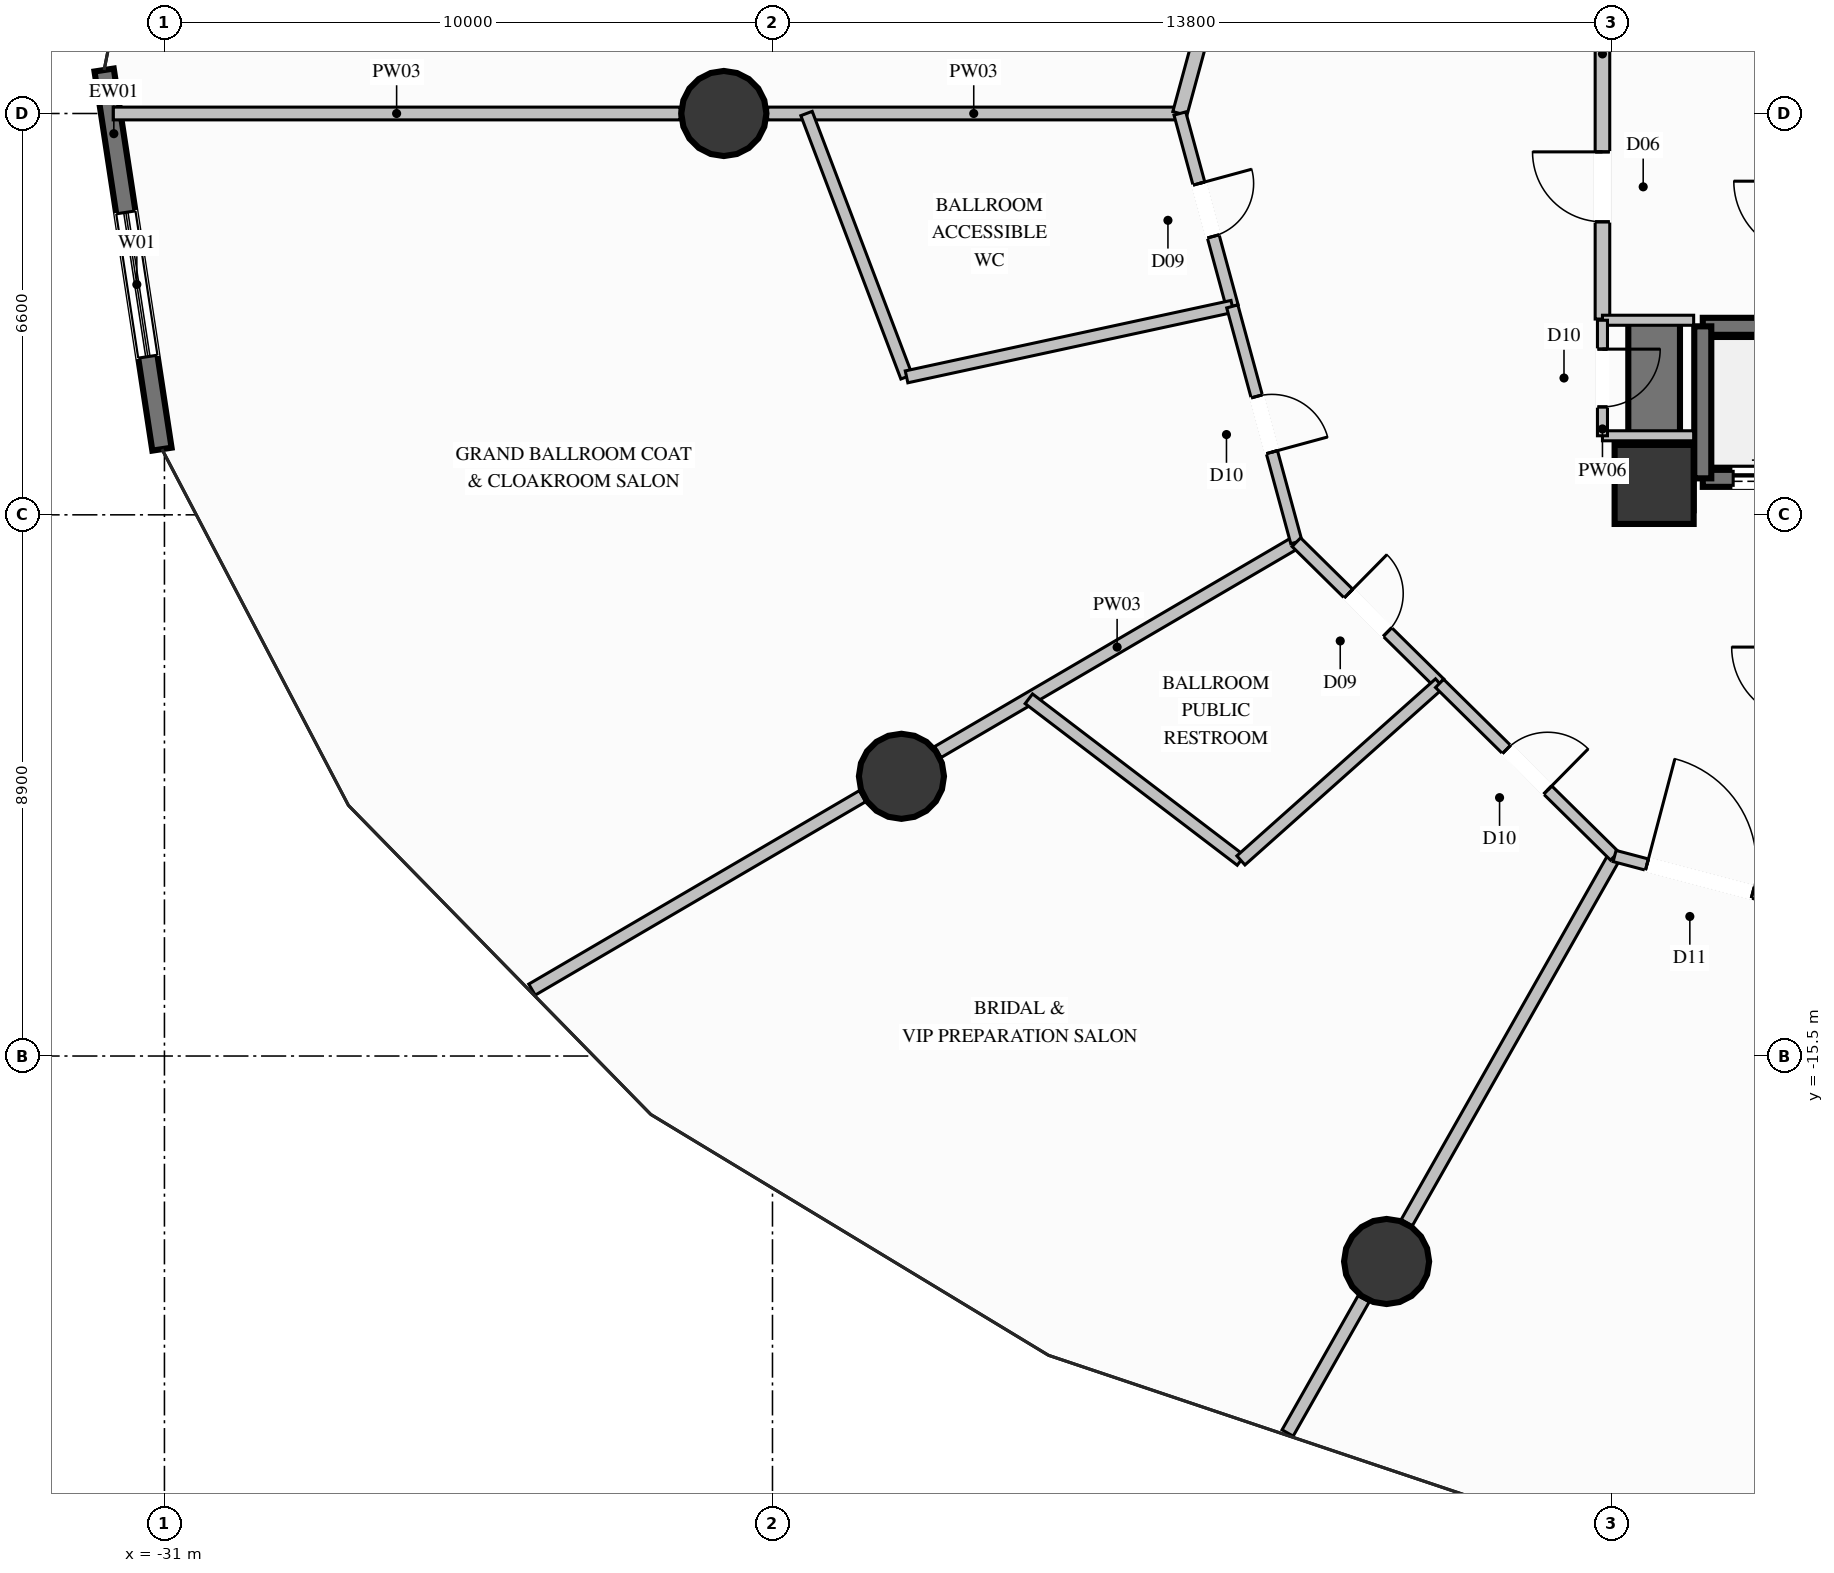
"""IFC4 building model, lengths in metres.
Left out: names, types, materials, properties, quantities, classifications, styles, units other than length and angle.
Written with IfcOpenShell. Run it as: python <this file> out.ifc"""

import sys

from ifc_helpers import new_model, si_unit, direction, frame, frame_2d, origin, origin_2d, place, context, subcontext, project, spatial, rectangle, circle, extrude, element, fill, save


model = new_model("IFC4")
c1 = context("Model", 3, precision=1e-05, world=origin(), true_north=direction((0.0, 1.0)))
c2 = subcontext(c1, "Body", "Model", "MODEL_VIEW")
j1 = project(units=[si_unit("LENGTHUNIT", "METRE"), si_unit("PLANEANGLEUNIT", "RADIAN")], contexts=[c1])
p1 = place(None, origin())
s1 = spatial("IfcSite", under=j1, at=p1, CompositionType="ELEMENT")
p2 = place(p1, origin())
s2 = spatial("IfcBuilding", under=s1, at=p2, CompositionType="ELEMENT")
p3 = place(p2, frame((0.0, 0.0, 12.6)))
s3 = spatial("IfcBuildingStorey", under=s2, at=p3, CompositionType="ELEMENT", Elevation=12.6)
p4 = place(p3, frame((-6.5, -6.1, 0.0), z_axis=(0.0, 0.0, 1.0), x_axis=(1.0, 0.0, 0.0)))
e1 = element("IfcColumn", 1, at=p4, inside=s3, PredefinedType="COLUMN", context=c2, shape_type="SweptSolid", body=[
    extrude(rectangle(XDim=1.3, YDim=1.3, at=origin_2d()), origin(), (0.0, 0.0, 1.0), 6.0),
])
p5 = place(p3, frame((-6.075, -6.1, 0.0), z_axis=(0.0, 0.0, 1.0), x_axis=(1.0, 0.0, 0.0)))
e2 = element("IfcWall", 2, at=p5, inside=s3, PredefinedType="SHEAR", context=c2, shape_type="SweptSolid", body=[
    extrude(rectangle(XDim=0.225, YDim=0.85, at=frame_2d((0.112, 0.0))), origin(), (0.0, 0.0, 1.0), 6.0),
])
p6 = place(p3, frame((-6.5, -6.525, 0.0), z_axis=(0.0, 0.0, 1.0), x_axis=(0.0, 1.0, 0.0)))
e3 = element("IfcWall", 3, at=p6, inside=s3, PredefinedType="SHEAR", context=c2, shape_type="SweptSolid", body=[
    extrude(rectangle(XDim=3.175, YDim=0.85, at=frame_2d((1.587, 0.0))), origin(), (0.0, 0.0, 1.0), 6.0),
])
for number, where, z_axis, x_axis in (
    (4, (-21.8, 0.0, 0.0), (0.0, 0.0, 1.0), (1.0, 0.0, 0.0)),
    (5, (-18.879, -10.9, 0.0), (0.0, 0.0, 1.0), (1.0, 0.0, 0.0)),
    (6, (-10.9, -18.879, 0.0), (0.0, 0.0, 1.0), (1.0, 0.0, 0.0)),
):
    element("IfcColumn", number, at=place(p3, frame(where, z_axis=z_axis, x_axis=x_axis)), inside=s3, PredefinedType="COLUMN", context=c2, shape_type="SweptSolid", body=[
        extrude(circle(Radius=0.7, at=origin_2d()), origin(), (0.0, 0.0, 1.0), 6.0),
    ])
p7 = place(p3, frame((-31.041, -5.52, 0.0), z_axis=(0.0, 0.0, 1.0), x_axis=(-0.150768496596, 0.988569097451, 0.0)))
e7 = element("IfcWall", 7, at=p7, inside=s3, PredefinedType="SOLIDWALL", context=c2, shape_type="SweptSolid", body=[
    extrude(rectangle(XDim=6.307, YDim=0.32, at=frame_2d((3.154, 0.0))), origin(), (0.0, 0.0, 1.0), 5.64),
])
p8 = place(p7, frame((1.539, 0.0, 0.65)))
e8 = element("IfcOpeningElement", 8, at=p8, cuts=e7, PredefinedType="OPENING", context=c2, shape_type="SweptSolid", body=[
    extrude(rectangle(XDim=2.4, YDim=3.2, at=frame_2d((1.2, 1.6))), frame((0.0, 0.17, 0.0), z_axis=(0.0, -1.0, 0.0), x_axis=(1.0, 0.0, 0.0)), (0.0, 0.0, 1.0), 0.34),
])
p9 = place(p3, frame((-5.7, -6.0, 0.0), z_axis=(0.0, 0.0, 1.0), x_axis=(1.0, 0.0, 0.0)))
e9 = element("IfcWall", 9, at=p9, inside=s3, PredefinedType="SOLIDWALL", context=c2, shape_type="SweptSolid", body=[
    extrude(rectangle(XDim=2.1, YDim=0.28, at=frame_2d((1.05, 0.0))), origin(), (0.0, 0.0, 1.0), 5.64),
])
p10 = place(p9, frame((0.5, 0.0, 0.0)))
e10 = element("IfcOpeningElement", 10, at=p10, cuts=e9, PredefinedType="OPENING", context=c2, shape_type="SweptSolid", body=[
    extrude(rectangle(XDim=1.1, YDim=2.2, at=frame_2d((0.55, 1.1))), frame((0.0, 0.15, 0.0), z_axis=(0.0, -1.0, 0.0), x_axis=(1.0, 0.0, 0.0)), (0.0, 0.0, 1.0), 0.3),
])
p11 = place(p3, frame((-3.6, -3.5, 0.0), z_axis=(0.0, 0.0, 1.0), x_axis=(-1.0, 0.0, 0.0)))
e11 = element("IfcWall", 11, at=p11, inside=s3, PredefinedType="SOLIDWALL", context=c2, shape_type="SweptSolid", body=[
    extrude(rectangle(XDim=2.1, YDim=0.28, at=frame_2d((1.05, 0.0))), origin(), (0.0, 0.0, 1.0), 5.64),
])
p12 = place(p3, frame((-5.7, -3.5, 0.0), z_axis=(0.0, 0.0, 1.0), x_axis=(0.0, -1.0, 0.0)))
e12 = element("IfcWall", 12, at=p12, inside=s3, PredefinedType="SOLIDWALL", context=c2, shape_type="SweptSolid", body=[
    extrude(rectangle(XDim=2.5, YDim=0.28, at=frame_2d((1.25, 0.0))), origin(), (0.0, 0.0, 1.0), 5.64),
])
p13 = place(p3, frame((-7.35, -3.38, 0.0), z_axis=(0.0, 0.0, 1.0), x_axis=(0.0, 1.0, 0.0)))
e13 = element("IfcWall", 13, at=p13, inside=s3, PredefinedType="PARTITIONING", context=c2, shape_type="SweptSolid", body=[
    extrude(rectangle(XDim=5.72, YDim=0.24, at=frame_2d((2.86, 0.0))), origin(), (0.0, 0.0, 1.0), 4.525),
])
p14 = place(p13, frame((1.599, 0.0, 0.0)))
e14 = element("IfcOpeningElement", 14, at=p14, cuts=e13, PredefinedType="OPENING", context=c2, shape_type="SweptSolid", body=[
    extrude(rectangle(XDim=1.15, YDim=2.2, at=frame_2d((0.575, 1.1))), frame((0.0, 0.13, 0.0), z_axis=(0.0, -1.0, 0.0), x_axis=(1.0, 0.0, 0.0)), (0.0, 0.0, 1.0), 0.26),
])
p15 = place(p3, frame((-7.35, -5.3, 0.0), z_axis=(0.0, 0.0, 1.0), x_axis=(1.0, 0.0, 0.0)))
e15 = element("IfcWall", 15, at=p15, inside=s3, PredefinedType="PARTITIONING", context=c2, shape_type="SweptSolid", body=[
    extrude(rectangle(XDim=1.5, YDim=0.165, at=frame_2d((0.75, 0.0))), origin(), (0.0, 0.0, 1.0), 3.825),
])
p16 = place(p3, frame((-5.85, -3.4, 0.0), z_axis=(0.0, 0.0, 1.0), x_axis=(-1.0, 0.0, 0.0)))
e16 = element("IfcWall", 16, at=p16, inside=s3, PredefinedType="PARTITIONING", context=c2, shape_type="SweptSolid", body=[
    extrude(rectangle(XDim=1.5, YDim=0.165, at=frame_2d((0.75, 0.0))), origin(), (0.0, 0.0, 1.0), 5.64),
])
p17 = place(p3, frame((-7.35, -3.4, 0.0), z_axis=(0.0, 0.0, 1.0), x_axis=(0.0, -1.0, 0.0)))
e17 = element("IfcWall", 17, at=p17, inside=s3, PredefinedType="PARTITIONING", context=c2, shape_type="SweptSolid", body=[
    extrude(rectangle(XDim=1.9, YDim=0.165, at=frame_2d((0.95, 0.0))), origin(), (0.0, 0.0, 1.0), 4.525),
])
p18 = place(p17, frame((0.475, 0.0, 0.0)))
e18 = element("IfcOpeningElement", 18, at=p18, cuts=e17, PredefinedType="OPENING", context=c2, shape_type="SweptSolid", body=[
    extrude(rectangle(XDim=0.95, YDim=2.1, at=frame_2d((0.475, 1.05))), frame((0.0, 0.093, 0.0), z_axis=(0.0, -1.0, 0.0), x_axis=(1.0, 0.0, 0.0)), (0.0, 0.0, 1.0), 0.185),
])
p19 = place(p3, frame((-14.3, 0.0, 0.0), z_axis=(0.0, 0.0, 1.0), x_axis=(-1.0, 0.0, 0.0)))
e19 = element("IfcWall", 19, at=p19, inside=s3, PredefinedType="PARTITIONING", context=c2, shape_type="SweptSolid", body=[
    extrude(rectangle(XDim=6.78, YDim=0.21, at=frame_2d((3.39, 0.0))), origin(), (0.0, 0.0, 1.0), 3.825),
])
p20 = place(p3, frame((-22.52, 0.0, 0.0), z_axis=(0.0, 0.0, 1.0), x_axis=(-1.0, 0.0, 0.0)))
e20 = element("IfcWall", 20, at=p20, inside=s3, PredefinedType="PARTITIONING", context=c2, shape_type="SweptSolid", body=[
    extrude(rectangle(XDim=9.323, YDim=0.21, at=frame_2d((4.662, 0.0))), origin(), (0.0, 0.0, 1.0), 5.64),
])
p21 = place(p3, frame((-12.384, -7.05, 0.0), z_axis=(0.0, 0.0, 1.0), x_axis=(-0.863039168853, -0.505137004213, 0.0)))
e21 = element("IfcWall", 21, at=p21, inside=s3, PredefinedType="PARTITIONING", context=c2, shape_type="SweptSolid", body=[
    extrude(rectangle(XDim=6.832, YDim=0.21, at=frame_2d((3.416, 0.0))), origin(), (0.0, 0.0, 1.0), 3.825),
])
p22 = place(p3, frame((-19.52, -11.227, 0.0), z_axis=(0.0, 0.0, 1.0), x_axis=(-0.863055278665, -0.50510947919, 0.0)))
e22 = element("IfcWall", 22, at=p22, inside=s3, PredefinedType="PARTITIONING", context=c2, shape_type="SweptSolid", body=[
    extrude(rectangle(XDim=6.297, YDim=0.21, at=frame_2d((3.149, 0.0))), origin(), (0.0, 0.0, 1.0), 5.64),
])
p23 = place(p3, frame((-7.15, -12.211, 0.0), z_axis=(0.0, 0.0, 1.0), x_axis=(-0.493203653226, -0.869913878752, 0.0)))
e23 = element("IfcWall", 23, at=p23, inside=s3, PredefinedType="PARTITIONING", context=c2, shape_type="SweptSolid", body=[
    extrude(rectangle(XDim=6.931, YDim=0.21, at=frame_2d((3.465, 0.0))), origin(), (0.0, 0.0, 1.0), 3.825),
])
p24 = place(p3, frame((-11.277, -19.492, 0.0), z_axis=(0.0, 0.0, 1.0), x_axis=(-0.49310969453, -0.869967142575, 0.0)))
e24 = element("IfcWall", 24, at=p24, inside=s3, PredefinedType="PARTITIONING", context=c2, shape_type="SweptSolid", body=[
    extrude(rectangle(XDim=2.537, YDim=0.21, at=frame_2d((1.269, 0.0))), origin(), (0.0, 0.0, 1.0), 5.64),
])
p25 = place(p3, frame((-12.384, 7.05, 0.0), z_axis=(0.0, 0.0, 1.0), x_axis=(-0.262260528785, -0.964997106235, 0.0)))
e25 = element("IfcWall", 25, at=p25, inside=s3, PredefinedType="PARTITIONING", context=c2, shape_type="SweptSolid", body=[
    extrude(rectangle(XDim=7.306, YDim=0.24, at=frame_2d((3.653, 0.0))), origin(), (0.0, 0.0, 1.0), 5.64),
])
p26 = place(p3, frame((-14.3, 0.0, 0.0), z_axis=(0.0, 0.0, 1.0), x_axis=(0.262250045558, -0.964999955236, 0.0)))
e26 = element("IfcWall", 26, at=p26, inside=s3, PredefinedType="PLUMBINGWALL", context=c2, shape_type="SweptSolid", body=[
    extrude(rectangle(XDim=3.287, YDim=0.2, at=frame_2d((1.644, 0.0))), origin(), (0.0, 0.0, 1.0), 5.64),
])
p27 = place(p26, frame((1.194, 0.0, 0.0)))
e27 = element("IfcOpeningElement", 27, at=p27, cuts=e26, PredefinedType="OPENING", context=c2, shape_type="SweptSolid", body=[
    extrude(rectangle(XDim=0.9, YDim=2.1, at=frame_2d((0.45, 1.05))), frame((0.0, 0.11, 0.0), z_axis=(0.0, -1.0, 0.0), x_axis=(1.0, 0.0, 0.0)), (0.0, 0.0, 1.0), 0.22),
])
p28 = place(p3, frame((-20.44, 0.0, 0.0), z_axis=(0.0, 0.0, 1.0), x_axis=(0.355070404359, -0.934839562678, 0.0)))
e28 = element("IfcWall", 28, at=p28, inside=s3, PredefinedType="PLUMBINGWALL", context=c2, shape_type="SweptSolid", body=[
    extrude(rectangle(XDim=4.633, YDim=0.2, at=frame_2d((2.316, 0.0))), origin(), (0.0, 0.0, 1.0), 5.64),
])
p29 = place(p3, frame((-13.438, -3.172, 0.0), z_axis=(0.0, 0.0, 1.0), x_axis=(-0.977388544576, -0.211451254266, 0.0)))
e29 = element("IfcWall", 29, at=p29, inside=s3, PredefinedType="PLUMBINGWALL", context=c2, shape_type="SweptSolid", body=[
    extrude(rectangle(XDim=5.481, YDim=0.2, at=frame_2d((2.74, 0.0))), origin(), (0.0, 0.0, 1.0), 5.64),
])
p30 = place(p3, frame((-13.438, -3.172, 0.0), z_axis=(0.0, 0.0, 1.0), x_axis=(0.262269103922, -0.9649947757, 0.0)))
e30 = element("IfcWall", 30, at=p30, inside=s3, PredefinedType="PARTITIONING", context=c2, shape_type="SweptSolid", body=[
    extrude(rectangle(XDim=4.019, YDim=0.19, at=frame_2d((2.009, 0.0))), origin(), (0.0, 0.0, 1.0), 5.64),
])
p31 = place(p30, frame((1.534, 0.0, 0.0)))
e31 = element("IfcOpeningElement", 31, at=p31, cuts=e30, PredefinedType="OPENING", context=c2, shape_type="SweptSolid", body=[
    extrude(rectangle(XDim=0.95, YDim=2.1, at=frame_2d((0.475, 1.05))), frame((0.0, 0.105, 0.0), z_axis=(0.0, -1.0, 0.0), x_axis=(1.0, 0.0, 0.0)), (0.0, 0.0, 1.0), 0.21),
])
p32 = place(p3, frame((-12.384, -7.05, 0.0), z_axis=(0.0, 0.0, 1.0), x_axis=(0.712072104827, -0.70210634346, 0.0)))
e32 = element("IfcWall", 32, at=p32, inside=s3, PredefinedType="PLUMBINGWALL", context=c2, shape_type="SweptSolid", body=[
    extrude(rectangle(XDim=3.307, YDim=0.2, at=frame_2d((1.654, 0.0))), origin(), (0.0, 0.0, 1.0), 5.64),
])
p33 = place(p32, frame((1.204, 0.0, 0.0)))
e33 = element("IfcOpeningElement", 33, at=p33, cuts=e32, PredefinedType="OPENING", context=c2, shape_type="SweptSolid", body=[
    extrude(rectangle(XDim=0.9, YDim=2.1, at=frame_2d((0.45, 1.05))), frame((0.0, 0.11, 0.0), z_axis=(0.0, -1.0, 0.0), x_axis=(1.0, 0.0, 0.0)), (0.0, 0.0, 1.0), 0.22),
])
p34 = place(p3, frame((-16.784, -9.625, 0.0), z_axis=(0.0, 0.0, 1.0), x_axis=(0.795386988506, -0.606101920898, 0.0)))
e34 = element("IfcWall", 34, at=p34, inside=s3, PredefinedType="PLUMBINGWALL", context=c2, shape_type="SweptSolid", body=[
    extrude(rectangle(XDim=4.385, YDim=0.2, at=frame_2d((2.193, 0.0))), origin(), (0.0, 0.0, 1.0), 5.64),
])
p35 = place(p3, frame((-10.029, -9.372, 0.0), z_axis=(0.0, 0.0, 1.0), x_axis=(-0.746611469302, -0.665260335438, 0.0)))
e35 = element("IfcWall", 35, at=p35, inside=s3, PredefinedType="PLUMBINGWALL", context=c2, shape_type="SweptSolid", body=[
    extrude(rectangle(XDim=4.375, YDim=0.2, at=frame_2d((2.188, 0.0))), origin(), (0.0, 0.0, 1.0), 5.64),
])
p36 = place(p3, frame((-10.029, -9.372, 0.0), z_axis=(0.0, 0.0, 1.0), x_axis=(0.712070649597, -0.702107819343, 0.0)))
e36 = element("IfcWall", 36, at=p36, inside=s3, PredefinedType="PARTITIONING", context=c2, shape_type="SweptSolid", body=[
    extrude(rectangle(XDim=4.043, YDim=0.19, at=frame_2d((2.022, 0.0))), origin(), (0.0, 0.0, 1.0), 5.64),
])
p37 = place(p36, frame((1.547, 0.0, 0.0)))
e37 = element("IfcOpeningElement", 37, at=p37, cuts=e36, PredefinedType="OPENING", context=c2, shape_type="SweptSolid", body=[
    extrude(rectangle(XDim=0.95, YDim=2.1, at=frame_2d((0.475, 1.05))), frame((0.0, 0.105, 0.0), z_axis=(0.0, -1.0, 0.0), x_axis=(1.0, 0.0, 0.0)), (0.0, 0.0, 1.0), 0.21),
])
p38 = place(p3, frame((-7.15, -12.211, 0.0), z_axis=(0.0, 0.0, 1.0), x_axis=(0.966820901533, -0.255455170937, 0.0)))
e38 = element("IfcWall", 38, at=p38, inside=s3, PredefinedType="PARTITIONING", context=c2, shape_type="SweptSolid", body=[
    extrude(rectangle(XDim=7.395, YDim=0.19, at=frame_2d((3.698, 0.0))), origin(), (0.0, 0.0, 1.0), 5.64),
])
p39 = place(p38, frame((0.55, 0.0, 0.0)))
e39 = element("IfcOpeningElement", 39, at=p39, cuts=e38, PredefinedType="OPENING", context=c2, shape_type="SweptSolid", body=[
    extrude(rectangle(XDim=1.8, YDim=2.4, at=frame_2d((0.9, 1.2))), frame((0.0, 0.105, 0.0), z_axis=(0.0, -1.0, 0.0), x_axis=(1.0, 0.0, 0.0)), (0.0, 0.0, 1.0), 0.21),
])
p40 = place(p38, frame((4.845, 0.0, 0.9)))
e40 = element("IfcOpeningElement", 40, at=p40, cuts=e38, PredefinedType="OPENING", context=c2, shape_type="SweptSolid", body=[
    extrude(rectangle(XDim=2.0, YDim=1.6, at=frame_2d((1.0, 0.8))), frame((0.0, 0.105, 0.0), z_axis=(0.0, -1.0, 0.0), x_axis=(1.0, 0.0, 0.0)), (0.0, 0.0, 1.0), 0.21),
])
p41 = place(p8, origin())
e41 = element("IfcWindow", 41, at=p41, inside=s3, PartitioningType="SINGLE_PANEL", PredefinedType="WINDOW", context=c2, shape_type="SweptSolid", body=[
    extrude(rectangle(XDim=2.4, YDim=3.2, at=frame_2d((1.2, 1.6))), frame((0.0, 0.03, 0.0), z_axis=(0.0, -1.0, 0.0), x_axis=(1.0, 0.0, 0.0)), (0.0, 0.0, 1.0), 0.06),
])
fill(e8, e41)
p42 = place(p10, origin())
e42 = element("IfcDoor", 42, at=p42, inside=s3, OperationType="SLIDING_TO_LEFT", PredefinedType="DOOR", context=c2, shape_type="SweptSolid", body=[
    extrude(rectangle(XDim=1.1, YDim=2.2, at=frame_2d((0.55, 1.1))), frame((0.0, 0.025, 0.0), z_axis=(0.0, -1.0, 0.0), x_axis=(1.0, 0.0, 0.0)), (0.0, 0.0, 1.0), 0.05),
])
fill(e10, e42)
p43 = place(p14, origin())
e43 = element("IfcDoor", 43, at=p43, inside=s3, OperationType="SINGLE_SWING_RIGHT", PredefinedType="DOOR", context=c2, shape_type="SweptSolid", body=[
    extrude(rectangle(XDim=1.15, YDim=2.2, at=frame_2d((0.575, 1.1))), frame((0.0, 0.025, 0.0), z_axis=(0.0, -1.0, 0.0), x_axis=(1.0, 0.0, 0.0)), (0.0, 0.0, 1.0), 0.05),
])
fill(e14, e43)
p44 = place(p18, origin())
e44 = element("IfcDoor", 44, at=p44, inside=s3, OperationType="SINGLE_SWING_LEFT", PredefinedType="DOOR", context=c2, shape_type="SweptSolid", body=[
    extrude(rectangle(XDim=0.95, YDim=2.1, at=frame_2d((0.475, 1.05))), frame((0.0, 0.025, 0.0), z_axis=(0.0, -1.0, 0.0), x_axis=(1.0, 0.0, 0.0)), (0.0, 0.0, 1.0), 0.05),
])
fill(e18, e44)
p45 = place(p27, origin())
e45 = element("IfcDoor", 45, at=p45, inside=s3, OperationType="SINGLE_SWING_LEFT", PredefinedType="DOOR", context=c2, shape_type="SweptSolid", body=[
    extrude(rectangle(XDim=0.9, YDim=2.1, at=frame_2d((0.45, 1.05))), frame((0.0, 0.025, 0.0), z_axis=(0.0, -1.0, 0.0), x_axis=(1.0, 0.0, 0.0)), (0.0, 0.0, 1.0), 0.05),
])
fill(e27, e45)
p46 = place(p31, origin())
e46 = element("IfcDoor", 46, at=p46, inside=s3, OperationType="SINGLE_SWING_RIGHT", PredefinedType="DOOR", context=c2, shape_type="SweptSolid", body=[
    extrude(rectangle(XDim=0.95, YDim=2.1, at=frame_2d((0.475, 1.05))), frame((0.0, 0.025, 0.0), z_axis=(0.0, -1.0, 0.0), x_axis=(1.0, 0.0, 0.0)), (0.0, 0.0, 1.0), 0.05),
])
fill(e31, e46)
p47 = place(p33, origin())
e47 = element("IfcDoor", 47, at=p47, inside=s3, OperationType="SINGLE_SWING_LEFT", PredefinedType="DOOR", context=c2, shape_type="SweptSolid", body=[
    extrude(rectangle(XDim=0.9, YDim=2.1, at=frame_2d((0.45, 1.05))), frame((0.0, 0.025, 0.0), z_axis=(0.0, -1.0, 0.0), x_axis=(1.0, 0.0, 0.0)), (0.0, 0.0, 1.0), 0.05),
])
fill(e33, e47)
p48 = place(p37, origin())
e48 = element("IfcDoor", 48, at=p48, inside=s3, OperationType="SINGLE_SWING_RIGHT", PredefinedType="DOOR", context=c2, shape_type="SweptSolid", body=[
    extrude(rectangle(XDim=0.95, YDim=2.1, at=frame_2d((0.475, 1.05))), frame((0.0, 0.025, 0.0), z_axis=(0.0, -1.0, 0.0), x_axis=(1.0, 0.0, 0.0)), (0.0, 0.0, 1.0), 0.05),
])
fill(e37, e48)
p49 = place(p39, origin())
e49 = element("IfcDoor", 49, at=p49, inside=s3, OperationType="SINGLE_SWING_LEFT", PredefinedType="DOOR", context=c2, shape_type="SweptSolid", body=[
    extrude(rectangle(XDim=1.8, YDim=2.4, at=frame_2d((0.9, 1.2))), frame((0.0, 0.025, 0.0), z_axis=(0.0, -1.0, 0.0), x_axis=(1.0, 0.0, 0.0)), (0.0, 0.0, 1.0), 0.05),
])
fill(e39, e49)
save(model, sys.argv[1])
